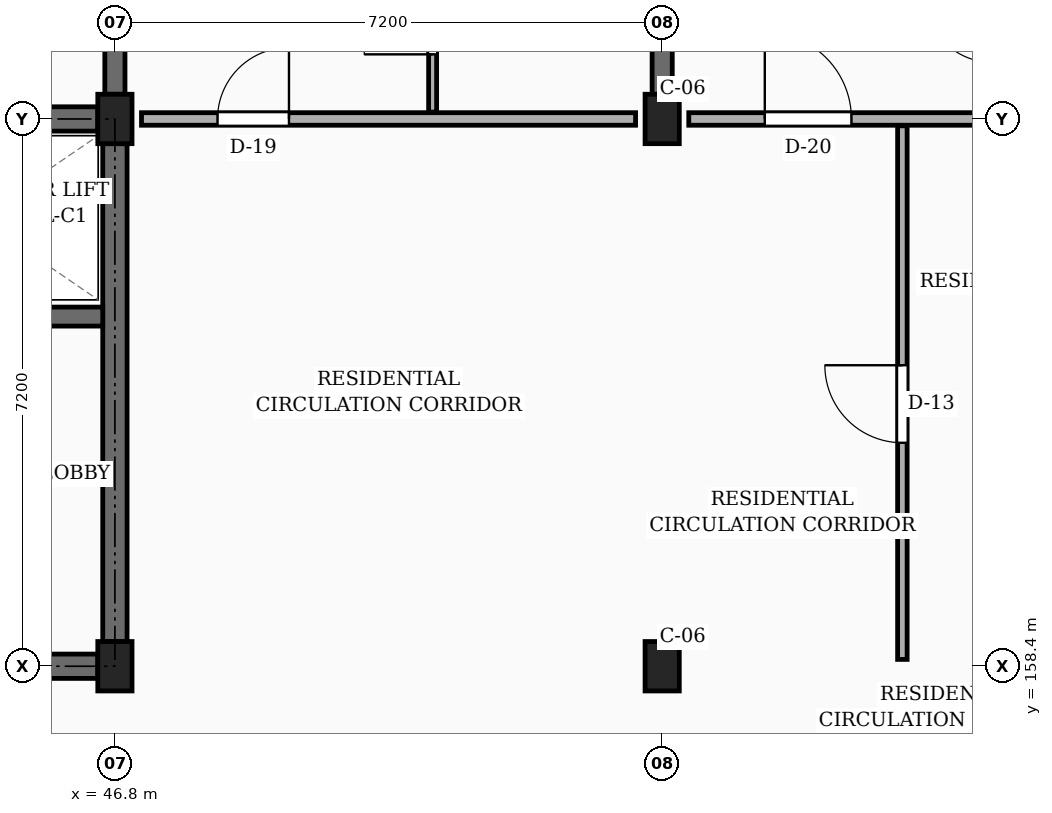
"""IFC4 building model, lengths in metres.
Left out: names, types, materials, properties, quantities, classifications, styles, units other than length and angle.
Written with IfcOpenShell. Run it as: python <this file> out.ifc"""

import sys

from ifc_helpers import new_model, si_unit, direction, frame, frame_2d, origin, origin_2d, place, context, subcontext, project, spatial, rectangle, extrude, element, fill, save


model = new_model("IFC4")
c1 = context("Model", 3, precision=1e-05, world=origin(), true_north=direction((0.0, 1.0)))
c2 = subcontext(c1, "Body", "Model", "MODEL_VIEW")
j1 = project(units=[si_unit("LENGTHUNIT", "METRE"), si_unit("PLANEANGLEUNIT", "RADIAN")], contexts=[c1])
p1 = place(None, origin())
s1 = spatial("IfcSite", under=j1, at=p1, CompositionType="ELEMENT")
p2 = place(p1, origin())
s2 = spatial("IfcBuilding", under=s1, at=p2, CompositionType="ELEMENT")
p3 = place(p2, frame((0.0, 0.0, 10.8)))
s3 = spatial("IfcBuildingStorey", under=s2, at=p3, CompositionType="ELEMENT", Elevation=10.8)
for number, where, z_axis, x_axis in (
    (1, (46.8, 158.4, 0.0), (0.0, 0.0, 1.0), (1.0, 0.0, 0.0)),
    (2, (46.8, 165.6, 0.0), (0.0, 0.0, 1.0), (1.0, 0.0, 0.0)),
    (3, (54.0, 158.4, 0.0), (0.0, 0.0, 1.0), (1.0, 0.0, 0.0)),
    (4, (54.0, 165.6, 0.0), (0.0, 0.0, 1.0), (1.0, 0.0, 0.0)),
):
    element("IfcColumn", number, at=place(p3, frame(where, z_axis=z_axis, x_axis=x_axis)), inside=s3, PredefinedType="COLUMN", context=c2, shape_type="SweptSolid", body=[
        extrude(rectangle(XDim=0.45, YDim=0.65, at=origin_2d()), origin(), (0.0, 0.0, 1.0), 3.15),
    ])
for number, where, z_axis, x_axis in (
    (5, (46.8, 165.925, 0.0), (0.0, 0.0, 1.0), (0.0, 1.0, 0.0)),
    (6, (54.0, 165.925, 0.0), (0.0, 0.0, 1.0), (0.0, 1.0, 0.0)),
):
    element("IfcWall", number, at=place(p3, frame(where, z_axis=z_axis, x_axis=x_axis)), inside=s3, PredefinedType="SOLIDWALL", context=c2, shape_type="SweptSolid", body=[
        extrude(rectangle(XDim=6.6, YDim=0.265, at=frame_2d((3.3, 0.0))), origin(), (0.0, 0.0, 1.0), 2.185),
    ])
p4 = place(p3, frame((39.825, 165.6, 0.0), z_axis=(0.0, 0.0, 1.0), x_axis=(1.0, 0.0, 0.0)))
e7 = element("IfcWall", 7, at=p4, inside=s3, PredefinedType="SHEAR", context=c2, shape_type="SweptSolid", body=[
    extrude(rectangle(XDim=6.75, YDim=0.32, at=frame_2d((3.375, 0.0))), origin(), (0.0, 0.0, 1.0), 2.885),
])
p5 = place(p3, frame((46.8, 158.725, 0.0), z_axis=(0.0, 0.0, 1.0), x_axis=(0.0, 1.0, 0.0)))
e8 = element("IfcWall", 8, at=p5, inside=s3, PredefinedType="SHEAR", context=c2, shape_type="SweptSolid", body=[
    extrude(rectangle(XDim=6.55, YDim=0.32, at=frame_2d((3.275, 0.0))), origin(), (0.0, 0.0, 1.0), 2.885),
])
p6 = place(p3, frame((39.825, 158.4, 0.0), z_axis=(0.0, 0.0, 1.0), x_axis=(1.0, 0.0, 0.0)))
e9 = element("IfcWall", 9, at=p6, inside=s3, PredefinedType="SHEAR", context=c2, shape_type="SweptSolid", body=[
    extrude(rectangle(XDim=6.75, YDim=0.32, at=frame_2d((3.375, 0.0))), origin(), (0.0, 0.0, 1.0), 2.885),
])
p7 = place(p6, frame((4.525, 0.0, 0.0)))
e10 = element("IfcOpeningElement", 10, at=p7, cuts=e9, PredefinedType="OPENING", context=c2, shape_type="SweptSolid", body=[
    extrude(rectangle(XDim=1.1, YDim=2.15, at=frame_2d((0.55, 1.075))), frame((0.0, 0.17, 0.0), z_axis=(0.0, -1.0, 0.0), x_axis=(1.0, 0.0, 0.0)), (0.0, 0.0, 1.0), 0.34),
])
p8 = place(p3, frame((43.325, 163.0, 0.0), z_axis=(0.0, 0.0, 1.0), x_axis=(1.0, 0.0, 0.0)))
e11 = element("IfcWall", 11, at=p8, inside=s3, PredefinedType="SHEAR", context=c2, shape_type="SweptSolid", body=[
    extrude(rectangle(XDim=3.315, YDim=0.25, at=frame_2d((1.657, 0.0))), origin(), (0.0, 0.0, 1.0), 2.885),
])
p9 = place(p8, frame((1.1, 0.0, 0.0)))
e12 = element("IfcOpeningElement", 12, at=p9, cuts=e11, PredefinedType="OPENING", context=c2, shape_type="SweptSolid", body=[
    extrude(rectangle(XDim=1.0, YDim=2.2, at=frame_2d((0.5, 1.1))), frame((0.0, 0.135, 0.0), z_axis=(0.0, -1.0, 0.0), x_axis=(1.0, 0.0, 0.0)), (0.0, 0.0, 1.0), 0.27),
])
p10 = place(p3, frame((47.15, 165.6, 0.0), z_axis=(0.0, 0.0, 1.0), x_axis=(1.0, 0.0, 0.0)))
e13 = element("IfcWall", 13, at=p10, inside=s3, PredefinedType="PARTITIONING", context=c2, shape_type="SweptSolid", body=[
    extrude(rectangle(XDim=6.5, YDim=0.165, at=frame_2d((3.25, 0.0))), origin(), (0.0, 0.0, 1.0), 2.235),
])
p11 = place(p10, frame((1.0, 0.0, 0.0)))
e14 = element("IfcOpeningElement", 14, at=p11, cuts=e13, PredefinedType="OPENING", context=c2, shape_type="SweptSolid", body=[
    extrude(rectangle(XDim=0.94, YDim=2.12, at=frame_2d((0.47, 1.06))), frame((0.0, 0.093, 0.0), z_axis=(0.0, -1.0, 0.0), x_axis=(1.0, 0.0, 0.0)), (0.0, 0.0, 1.0), 0.185),
])
p12 = place(p3, frame((54.35, 165.6, 0.0), z_axis=(0.0, 0.0, 1.0), x_axis=(1.0, 0.0, 0.0)))
e15 = element("IfcWall", 15, at=p12, inside=s3, PredefinedType="PARTITIONING", context=c2, shape_type="SweptSolid", body=[
    extrude(rectangle(XDim=6.5, YDim=0.165, at=frame_2d((3.25, 0.0))), origin(), (0.0, 0.0, 1.0), 2.235),
])
p13 = place(p12, frame((1.0, 0.0, 0.0)))
e16 = element("IfcOpeningElement", 16, at=p13, cuts=e15, PredefinedType="OPENING", context=c2, shape_type="SweptSolid", body=[
    extrude(rectangle(XDim=1.14, YDim=2.18, at=frame_2d((0.57, 1.09))), frame((0.0, 0.093, 0.0), z_axis=(0.0, -1.0, 0.0), x_axis=(1.0, 0.0, 0.0)), (0.0, 0.0, 1.0), 0.185),
])
p14 = place(p3, frame((50.98, 165.69, 0.0), z_axis=(0.0, 0.0, 1.0), x_axis=(0.0, 1.0, 0.0)))
e17 = element("IfcWall", 17, at=p14, inside=s3, PredefinedType="PARTITIONING", context=c2, shape_type="SweptSolid", body=[
    extrude(rectangle(XDim=2.42, YDim=0.105, at=frame_2d((1.21, 0.0))), origin(), (0.0, 0.0, 1.0), 2.32),
])
p15 = place(p14, frame((0.76, 0.0, 0.0)))
e18 = element("IfcOpeningElement", 18, at=p15, cuts=e17, PredefinedType="OPENING", context=c2, shape_type="SweptSolid", body=[
    extrude(rectangle(XDim=0.9, YDim=2.05, at=frame_2d((0.45, 1.025))), frame((0.0, 0.062, 0.0), z_axis=(0.0, -1.0, 0.0), x_axis=(1.0, 0.0, 0.0)), (0.0, 0.0, 1.0), 0.125),
])
p16 = place(p3, frame((57.16, 158.49, 0.0), z_axis=(0.0, 0.0, 1.0), x_axis=(0.0, 1.0, 0.0)))
e19 = element("IfcWall", 19, at=p16, inside=s3, PredefinedType="PARTITIONING", context=c2, shape_type="SweptSolid", body=[
    extrude(rectangle(XDim=7.02, YDim=0.125, at=frame_2d((3.51, 0.0))), origin(), (0.0, 0.0, 1.0), 2.32),
])
p17 = place(p16, frame((2.85, 0.0, 0.0)))
e20 = element("IfcOpeningElement", 20, at=p17, cuts=e19, PredefinedType="OPENING", context=c2, shape_type="SweptSolid", body=[
    extrude(rectangle(XDim=1.02, YDim=2.15, at=frame_2d((0.51, 1.075))), frame((0.0, 0.073, 0.0), z_axis=(0.0, -1.0, 0.0), x_axis=(1.0, 0.0, 0.0)), (0.0, 0.0, 1.0), 0.145),
])
p18 = place(p11, origin())
e21 = element("IfcDoor", 21, at=p18, inside=s3, OperationType="SINGLE_SWING_RIGHT", PredefinedType="DOOR", context=c2, shape_type="SweptSolid", body=[
    extrude(rectangle(XDim=0.94, YDim=2.12, at=frame_2d((0.47, 1.06))), frame((0.0, 0.025, 0.0), z_axis=(0.0, -1.0, 0.0), x_axis=(1.0, 0.0, 0.0)), (0.0, 0.0, 1.0), 0.05),
])
fill(e14, e21)
p19 = place(p13, origin())
e22 = element("IfcDoor", 22, at=p19, inside=s3, OperationType="SINGLE_SWING_LEFT", PredefinedType="DOOR", context=c2, shape_type="SweptSolid", body=[
    extrude(rectangle(XDim=1.14, YDim=2.18, at=frame_2d((0.57, 1.09))), frame((0.0, 0.025, 0.0), z_axis=(0.0, -1.0, 0.0), x_axis=(1.0, 0.0, 0.0)), (0.0, 0.0, 1.0), 0.05),
])
fill(e16, e22)
p20 = place(p15, origin())
e23 = element("IfcDoor", 23, at=p20, inside=s3, OperationType="SINGLE_SWING_LEFT", PredefinedType="DOOR", context=c2, shape_type="SweptSolid", body=[
    extrude(rectangle(XDim=0.9, YDim=2.05, at=frame_2d((0.45, 1.025))), frame((0.0, 0.025, 0.0), z_axis=(0.0, -1.0, 0.0), x_axis=(1.0, 0.0, 0.0)), (0.0, 0.0, 1.0), 0.05),
])
fill(e18, e23)
p21 = place(p17, origin())
e24 = element("IfcDoor", 24, at=p21, inside=s3, OperationType="SINGLE_SWING_RIGHT", PredefinedType="DOOR", context=c2, shape_type="SweptSolid", body=[
    extrude(rectangle(XDim=1.02, YDim=2.15, at=frame_2d((0.51, 1.075))), frame((0.0, 0.025, 0.0), z_axis=(0.0, -1.0, 0.0), x_axis=(1.0, 0.0, 0.0)), (0.0, 0.0, 1.0), 0.05),
])
fill(e20, e24)
save(model, sys.argv[1])
